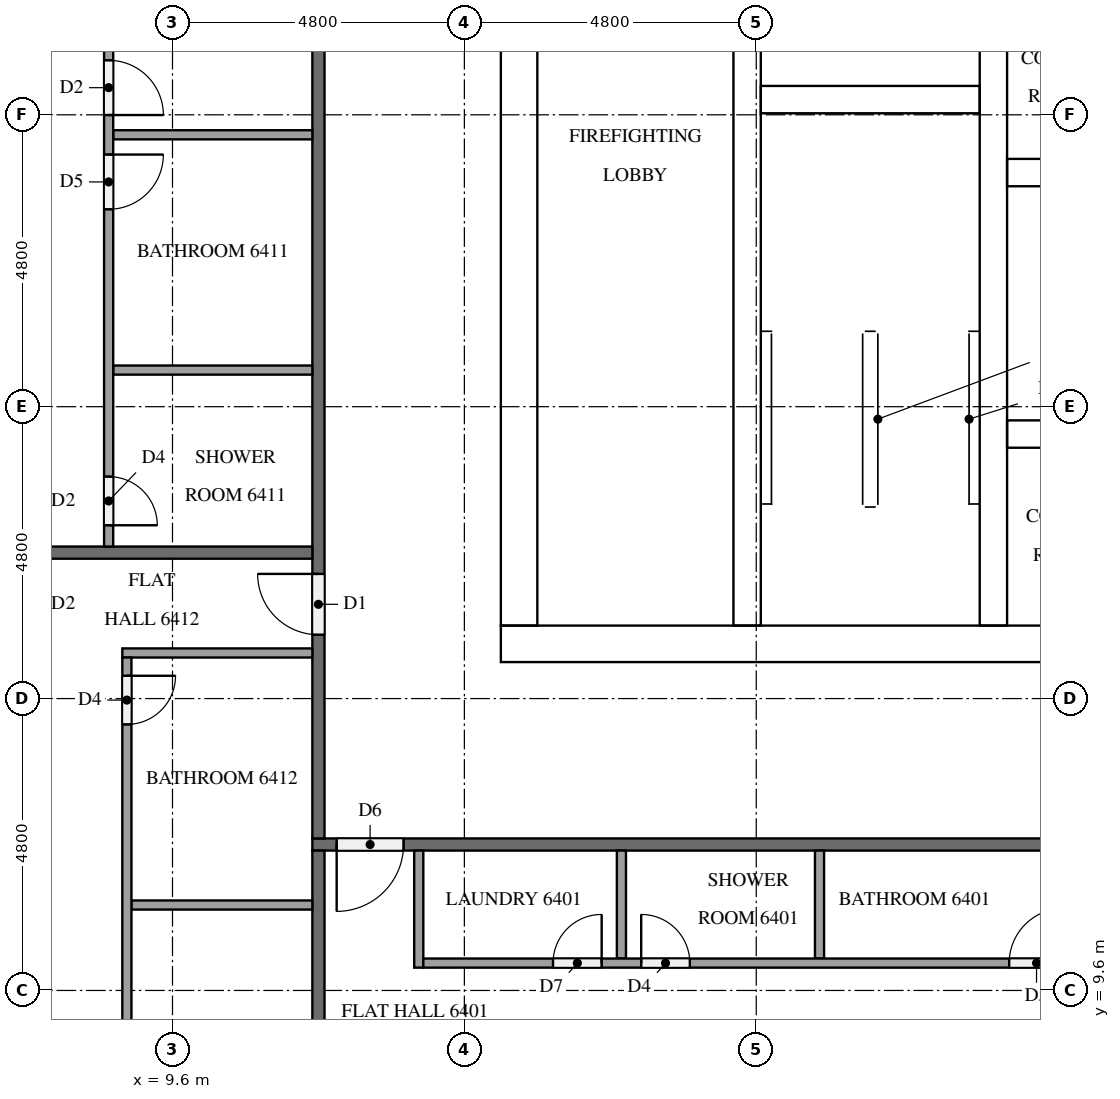
"""IFC4 building model, lengths in metres.
Left out: names, types, materials, properties, quantities, classifications, styles, units other than length and angle.
Written with IfcOpenShell. Run it as: python <this file> out.ifc"""

import sys

from ifc_helpers import new_model, si_unit, direction, frame, frame_2d, origin, place, context, subcontext, project, spatial, rectangle, extrude, element, fill, save


model = new_model("IFC4")
c1 = context("Model", 3, precision=1e-05, world=origin(), true_north=direction((0.0, 1.0)))
c2 = subcontext(c1, "Body", "Model", "MODEL_VIEW")
j1 = project(units=[si_unit("LENGTHUNIT", "METRE"), si_unit("PLANEANGLEUNIT", "RADIAN")], contexts=[c1])
p1 = place(None, origin())
s1 = spatial("IfcSite", under=j1, at=p1, CompositionType="ELEMENT")
p2 = place(p1, origin())
s2 = spatial("IfcBuilding", under=s1, at=p2, CompositionType="ELEMENT")
p3 = place(p2, frame((0.0, 0.0, 245.7)))
s3 = spatial("IfcBuildingStorey", under=s2, at=p3, CompositionType="ELEMENT", Elevation=245.7)
p4 = place(p3, frame((15.0, 15.3, 0.0), z_axis=(0.0, 0.0, 1.0), x_axis=(1.0, 0.0, 0.0)))
e1 = element("IfcWall", 1, at=p4, inside=s3, PredefinedType="SHEAR", context=c2, shape_type="SweptSolid", body=[
    extrude(rectangle(XDim=32.4, YDim=0.6, at=frame_2d((16.2, 0.0))), origin(), (0.0, 0.0, 1.0), 3.2),
])
p5 = place(p4, frame((15.3, 0.0, 0.0)))
e2 = element("IfcOpeningElement", 2, at=p5, cuts=e1, PredefinedType="OPENING", context=c2, shape_type="SweptSolid", body=[
    extrude(rectangle(XDim=1.8, YDim=2.1, at=frame_2d((0.9, 1.05))), frame((0.0, 0.31, 0.0), z_axis=(0.0, -1.0, 0.0), x_axis=(1.0, 0.0, 0.0)), (0.0, 0.0, 1.0), 0.62),
])
p6 = place(p3, frame((15.3, 15.6, 0.0), z_axis=(0.0, 0.0, 1.0), x_axis=(0.0, 1.0, 0.0)))
e3 = element("IfcWall", 3, at=p6, inside=s3, PredefinedType="SHEAR", context=c2, shape_type="SweptSolid", body=[
    extrude(rectangle(XDim=21.6, YDim=0.6, at=frame_2d((10.8, 0.0))), origin(), (0.0, 0.0, 1.0), 3.2),
])
p7 = place(p6, frame((5.16, 0.0, 0.0)))
e4 = element("IfcOpeningElement", 4, at=p7, cuts=e3, PredefinedType="OPENING", context=c2, shape_type="SweptSolid", body=[
    extrude(rectangle(XDim=1.2, YDim=2.1, at=frame_2d((0.6, 1.05))), frame((0.0, 0.31, 0.0), z_axis=(0.0, -1.0, 0.0), x_axis=(1.0, 0.0, 0.0)), (0.0, 0.0, 1.0), 0.62),
])
p8 = place(p3, frame((19.05, 15.6, 0.0), z_axis=(0.0, 0.0, 1.0), x_axis=(0.0, 1.0, 0.0)))
e5 = element("IfcWall", 5, at=p8, inside=s3, PredefinedType="SHEAR", context=c2, shape_type="SweptSolid", body=[
    extrude(rectangle(XDim=15.425, YDim=0.45, at=frame_2d((7.712, 0.0))), origin(), (0.0, 0.0, 1.0), 3.2),
])
p9 = place(p8, frame((9.85, 0.0, 0.0)))
e6 = element("IfcOpeningElement", 6, at=p9, cuts=e5, PredefinedType="OPENING", context=c2, shape_type="SweptSolid", body=[
    extrude(rectangle(XDim=1.1, YDim=2.1, at=frame_2d((0.55, 1.05))), frame((0.0, 0.235, 0.0), z_axis=(0.0, -1.0, 0.0), x_axis=(1.0, 0.0, 0.0)), (0.0, 0.0, 1.0), 0.47),
])
p10 = place(p8, frame((13.35, 0.0, 0.0)))
e7 = element("IfcOpeningElement", 7, at=p10, cuts=e5, PredefinedType="OPENING", context=c2, shape_type="SweptSolid", body=[
    extrude(rectangle(XDim=1.1, YDim=2.1, at=frame_2d((0.55, 1.05))), frame((0.0, 0.235, 0.0), z_axis=(0.0, -1.0, 0.0), x_axis=(1.0, 0.0, 0.0)), (0.0, 0.0, 1.0), 0.47),
])
p11 = place(p8, frame((0.6, 0.0, 0.0)))
e8 = element("IfcOpeningElement", 8, at=p11, cuts=e5, PredefinedType="OPENING", context=c2, shape_type="SweptSolid", body=[
    extrude(rectangle(XDim=1.2, YDim=2.1, at=frame_2d((0.6, 1.05))), frame((0.0, 0.235, 0.0), z_axis=(0.0, -1.0, 0.0), x_axis=(1.0, 0.0, 0.0)), (0.0, 0.0, 1.0), 0.47),
])
p12 = place(p3, frame((23.1, 15.6, 0.0), z_axis=(0.0, 0.0, 1.0), x_axis=(0.0, 1.0, 0.0)))
e9 = element("IfcWall", 9, at=p12, inside=s3, PredefinedType="SHEAR", context=c2, shape_type="SweptSolid", body=[
    extrude(rectangle(XDim=21.6, YDim=0.45, at=frame_2d((10.8, 0.0))), origin(), (0.0, 0.0, 1.0), 3.2),
])
p13 = place(p3, frame((19.275, 24.25, 0.0), z_axis=(0.0, 0.0, 1.0), x_axis=(1.0, 0.0, 0.0)))
e10 = element("IfcWall", 10, at=p13, inside=s3, PredefinedType="SHEAR", context=c2, shape_type="SweptSolid", body=[
    extrude(rectangle(XDim=3.6, YDim=0.45, at=frame_2d((1.8, 0.0))), origin(), (0.0, 0.0, 1.0), 3.2),
])
p14 = place(p3, frame((23.325, 18.75, 0.0), z_axis=(0.0, 0.0, 1.0), x_axis=(1.0, 0.0, 0.0)))
e11 = element("IfcWall", 11, at=p14, inside=s3, PredefinedType="SHEAR", context=c2, shape_type="SweptSolid", body=[
    extrude(rectangle(XDim=5.6, YDim=0.45, at=frame_2d((2.8, 0.0))), origin(), (0.0, 0.0, 1.0), 3.2),
])
p15 = place(p14, frame((0.403, 0.0, 0.0)))
e12 = element("IfcOpeningElement", 12, at=p15, cuts=e11, PredefinedType="OPENING", context=c2, shape_type="SweptSolid", body=[
    extrude(rectangle(XDim=1.0, YDim=2.1, at=frame_2d((0.5, 1.05))), frame((0.0, 0.235, 0.0), z_axis=(0.0, -1.0, 0.0), x_axis=(1.0, 0.0, 0.0)), (0.0, 0.0, 1.0), 0.47),
])
p16 = place(p14, frame((3.078, 0.0, 0.0)))
e13 = element("IfcOpeningElement", 13, at=p16, cuts=e11, PredefinedType="OPENING", context=c2, shape_type="SweptSolid", body=[
    extrude(rectangle(XDim=1.0, YDim=2.1, at=frame_2d((0.5, 1.05))), frame((0.0, 0.235, 0.0), z_axis=(0.0, -1.0, 0.0), x_axis=(1.0, 0.0, 0.0)), (0.0, 0.0, 1.0), 0.47),
])
p17 = place(p3, frame((23.325, 23.05, 0.0), z_axis=(0.0, 0.0, 1.0), x_axis=(1.0, 0.0, 0.0)))
e14 = element("IfcWall", 14, at=p17, inside=s3, PredefinedType="SHEAR", context=c2, shape_type="SweptSolid", body=[
    extrude(rectangle(XDim=15.75, YDim=0.45, at=frame_2d((7.875, 0.0))), origin(), (0.0, 0.0, 1.0), 3.2),
])
p18 = place(p17, frame((0.32, 0.0, 0.0)))
e15 = element("IfcOpeningElement", 15, at=p18, cuts=e14, PredefinedType="OPENING", context=c2, shape_type="SweptSolid", body=[
    extrude(rectangle(XDim=1.0, YDim=2.1, at=frame_2d((0.5, 1.05))), frame((0.0, 0.235, 0.0), z_axis=(0.0, -1.0, 0.0), x_axis=(1.0, 0.0, 0.0)), (0.0, 0.0, 1.0), 0.47),
])
p19 = place(p17, frame((2.978, 0.0, 0.0)))
e16 = element("IfcOpeningElement", 16, at=p19, cuts=e14, PredefinedType="OPENING", context=c2, shape_type="SweptSolid", body=[
    extrude(rectangle(XDim=1.0, YDim=2.1, at=frame_2d((0.5, 1.05))), frame((0.0, 0.235, 0.0), z_axis=(0.0, -1.0, 0.0), x_axis=(1.0, 0.0, 0.0)), (0.0, 0.0, 1.0), 0.47),
])
p20 = place(p17, frame((10.953, 0.0, 0.0)))
e17 = element("IfcOpeningElement", 17, at=p20, cuts=e14, PredefinedType="OPENING", context=c2, shape_type="SweptSolid", body=[
    extrude(rectangle(XDim=1.0, YDim=2.1, at=frame_2d((0.5, 1.05))), frame((0.0, 0.235, 0.0), z_axis=(0.0, -1.0, 0.0), x_axis=(1.0, 0.0, 0.0)), (0.0, 0.0, 1.0), 0.47),
])
p21 = place(p17, frame((13.612, 0.0, 0.0)))
e18 = element("IfcOpeningElement", 18, at=p21, cuts=e14, PredefinedType="OPENING", context=c2, shape_type="SweptSolid", body=[
    extrude(rectangle(XDim=1.0, YDim=2.1, at=frame_2d((0.5, 1.05))), frame((0.0, 0.235, 0.0), z_axis=(0.0, -1.0, 0.0), x_axis=(1.0, 0.0, 0.0)), (0.0, 0.0, 1.0), 0.47),
])
p22 = place(p3, frame((50.5, 12.0, 0.0), z_axis=(0.0, 0.0, 1.0), x_axis=(-1.0, 0.0, 0.0)))
e19 = element("IfcWall", 19, at=p22, inside=s3, PredefinedType="PARTITIONING", context=c2, shape_type="SweptSolid", body=[
    extrude(rectangle(XDim=38.6, YDim=0.2, at=frame_2d((19.3, 0.0))), origin(), (0.0, 0.0, 1.0), 3.2),
])
p23 = place(p22, frame((37.1, 0.0, 0.0)))
e20 = element("IfcOpeningElement", 20, at=p23, cuts=e19, PredefinedType="OPENING", context=c2, shape_type="SweptSolid", body=[
    extrude(rectangle(XDim=1.1, YDim=2.1, at=frame_2d((0.55, 1.05))), frame((0.0, 0.11, 0.0), z_axis=(0.0, -1.0, 0.0), x_axis=(1.0, 0.0, 0.0)), (0.0, 0.0, 1.0), 0.22),
])
p24 = place(p22, frame((17.95, 0.0, 0.0)))
e21 = element("IfcOpeningElement", 21, at=p24, cuts=e19, PredefinedType="OPENING", context=c2, shape_type="SweptSolid", body=[
    extrude(rectangle(XDim=1.0, YDim=2.1, at=frame_2d((0.5, 1.05))), frame((0.0, 0.11, 0.0), z_axis=(0.0, -1.0, 0.0), x_axis=(1.0, 0.0, 0.0)), (0.0, 0.0, 1.0), 0.22),
])
p25 = place(p22, frame((8.35, 0.0, 0.0)))
e22 = element("IfcOpeningElement", 22, at=p25, cuts=e19, PredefinedType="OPENING", context=c2, shape_type="SweptSolid", body=[
    extrude(rectangle(XDim=1.0, YDim=2.1, at=frame_2d((0.5, 1.05))), frame((0.0, 0.11, 0.0), z_axis=(0.0, -1.0, 0.0), x_axis=(1.0, 0.0, 0.0)), (0.0, 0.0, 1.0), 0.22),
])
p26 = place(p3, frame((12.0, 12.1, 0.0), z_axis=(0.0, 0.0, 1.0), x_axis=(0.0, 1.0, 0.0)))
e23 = element("IfcWall", 23, at=p26, inside=s3, PredefinedType="PARTITIONING", context=c2, shape_type="SweptSolid", body=[
    extrude(rectangle(XDim=28.6, YDim=0.2, at=frame_2d((14.3, 0.0))), origin(), (0.0, 0.0, 1.0), 3.2),
])
p27 = place(p26, frame((27.35, 0.0, 0.0)))
e24 = element("IfcOpeningElement", 24, at=p27, cuts=e23, PredefinedType="OPENING", context=c2, shape_type="SweptSolid", body=[
    extrude(rectangle(XDim=1.0, YDim=2.1, at=frame_2d((0.5, 1.05))), frame((0.0, 0.11, 0.0), z_axis=(0.0, -1.0, 0.0), x_axis=(1.0, 0.0, 0.0)), (0.0, 0.0, 1.0), 0.22),
])
p28 = place(p26, frame((17.75, 0.0, 0.0)))
e25 = element("IfcOpeningElement", 25, at=p28, cuts=e23, PredefinedType="OPENING", context=c2, shape_type="SweptSolid", body=[
    extrude(rectangle(XDim=1.0, YDim=2.1, at=frame_2d((0.5, 1.05))), frame((0.0, 0.11, 0.0), z_axis=(0.0, -1.0, 0.0), x_axis=(1.0, 0.0, 0.0)), (0.0, 0.0, 1.0), 0.22),
])
p29 = place(p26, frame((3.35, 0.0, 0.0)))
e26 = element("IfcOpeningElement", 26, at=p29, cuts=e23, PredefinedType="OPENING", context=c2, shape_type="SweptSolid", body=[
    extrude(rectangle(XDim=1.0, YDim=2.1, at=frame_2d((0.5, 1.05))), frame((0.0, 0.11, 0.0), z_axis=(0.0, -1.0, 0.0), x_axis=(1.0, 0.0, 0.0)), (0.0, 0.0, 1.0), 0.22),
])
p30 = place(p3, frame((12.0, 4.9, 0.0), z_axis=(0.0, 0.0, 1.0), x_axis=(0.0, 1.0, 0.0)))
e27 = element("IfcWall", 27, at=p30, inside=s3, PredefinedType="PARTITIONING", context=c2, shape_type="SweptSolid", body=[
    extrude(rectangle(XDim=7.0, YDim=0.2, at=frame_2d((3.5, 0.0))), origin(), (0.0, 0.0, 1.0), 3.2),
])
p31 = place(p3, frame((0.1, 16.8, 0.0), z_axis=(0.0, 0.0, 1.0), x_axis=(1.0, 0.0, 0.0)))
e28 = element("IfcWall", 28, at=p31, inside=s3, PredefinedType="PARTITIONING", context=c2, shape_type="SweptSolid", body=[
    extrude(rectangle(XDim=11.8, YDim=0.2, at=frame_2d((5.9, 0.0))), origin(), (0.0, 0.0, 1.0), 3.2),
])
for number, where, z_axis, x_axis in (
    (29, (16.983, 11.9, 0.0), (0.0, 0.0, 1.0), (0.0, -1.0, 0.0)),
    (30, (20.24, 11.9, 0.0), (0.0, 0.0, 1.0), (0.0, -1.0, 0.0)),
):
    element("IfcWall", number, at=place(p3, frame(where, z_axis=z_axis, x_axis=x_axis)), inside=s3, PredefinedType="PARTITIONING", context=c2, shape_type="SweptSolid", body=[
        extrude(rectangle(XDim=1.775, YDim=0.15, at=frame_2d((0.887, 0.0))), origin(), (0.0, 0.0, 1.0), 3.2),
    ])
p32 = place(p3, frame((13.65, 11.9, 0.0), z_axis=(0.0, 0.0, 1.0), x_axis=(0.0, -1.0, 0.0)))
e31 = element("IfcWall", 31, at=p32, inside=s3, PredefinedType="PARTITIONING", context=c2, shape_type="SweptSolid", body=[
    extrude(rectangle(XDim=1.925, YDim=0.15, at=frame_2d((0.962, 0.0))), origin(), (0.0, 0.0, 1.0), 3.2),
])
p33 = place(p3, frame((13.725, 10.05, 0.0), z_axis=(0.0, 0.0, 1.0), x_axis=(1.0, 0.0, 0.0)))
e32 = element("IfcWall", 32, at=p33, inside=s3, PredefinedType="PARTITIONING", context=c2, shape_type="SweptSolid", body=[
    extrude(rectangle(XDim=17.375, YDim=0.15, at=frame_2d((8.688, 0.0))), origin(), (0.0, 0.0, 1.0), 3.2),
])
p34 = place(p33, frame((2.133, 0.0, 0.0)))
e33 = element("IfcOpeningElement", 33, at=p34, cuts=e32, PredefinedType="OPENING", context=c2, shape_type="SweptSolid", body=[
    extrude(rectangle(XDim=0.8, YDim=2.1, at=frame_2d((0.4, 1.05))), frame((0.0, 0.085, 0.0), z_axis=(0.0, -1.0, 0.0), x_axis=(1.0, 0.0, 0.0)), (0.0, 0.0, 1.0), 0.17),
])
p35 = place(p33, frame((3.583, 0.0, 0.0)))
e34 = element("IfcOpeningElement", 34, at=p35, cuts=e32, PredefinedType="OPENING", context=c2, shape_type="SweptSolid", body=[
    extrude(rectangle(XDim=0.8, YDim=2.1, at=frame_2d((0.4, 1.05))), frame((0.0, 0.085, 0.0), z_axis=(0.0, -1.0, 0.0), x_axis=(1.0, 0.0, 0.0)), (0.0, 0.0, 1.0), 0.17),
])
p36 = place(p33, frame((9.635, 0.0, 0.0)))
e35 = element("IfcOpeningElement", 35, at=p36, cuts=e32, PredefinedType="OPENING", context=c2, shape_type="SweptSolid", body=[
    extrude(rectangle(XDim=0.9, YDim=2.1, at=frame_2d((0.45, 1.05))), frame((0.0, 0.085, 0.0), z_axis=(0.0, -1.0, 0.0), x_axis=(1.0, 0.0, 0.0)), (0.0, 0.0, 1.0), 0.17),
])
p37 = place(p33, frame((11.184, 0.0, 0.0)))
e36 = element("IfcOpeningElement", 36, at=p37, cuts=e32, PredefinedType="OPENING", context=c2, shape_type="SweptSolid", body=[
    extrude(rectangle(XDim=0.9, YDim=2.1, at=frame_2d((0.45, 1.05))), frame((0.0, 0.085, 0.0), z_axis=(0.0, -1.0, 0.0), x_axis=(1.0, 0.0, 0.0)), (0.0, 0.0, 1.0), 0.17),
])
for number, where, z_axis, x_axis in (
    (37, (11.9, 23.671, 0.0), (0.0, 0.0, 1.0), (-1.0, 0.0, 0.0)),
    (38, (11.9, 19.802, 0.0), (0.0, 0.0, 1.0), (-1.0, 0.0, 0.0)),
):
    element("IfcWall", number, at=place(p3, frame(where, z_axis=z_axis, x_axis=x_axis)), inside=s3, PredefinedType="PARTITIONING", context=c2, shape_type="SweptSolid", body=[
        extrude(rectangle(XDim=3.275, YDim=0.15, at=frame_2d((1.637, 0.0))), origin(), (0.0, 0.0, 1.0), 3.2),
    ])
p38 = place(p3, frame((8.55, 29.475, 0.0), z_axis=(0.0, 0.0, 1.0), x_axis=(0.0, -1.0, 0.0)))
e39 = element("IfcWall", 39, at=p38, inside=s3, PredefinedType="PARTITIONING", context=c2, shape_type="SweptSolid", body=[
    extrude(rectangle(XDim=12.575, YDim=0.15, at=frame_2d((6.288, 0.0))), origin(), (0.0, 0.0, 1.0), 3.2),
])
p39 = place(p38, frame((4.579, 0.0, 0.0)))
e40 = element("IfcOpeningElement", 40, at=p39, cuts=e39, PredefinedType="OPENING", context=c2, shape_type="SweptSolid", body=[
    extrude(rectangle(XDim=0.9, YDim=2.1, at=frame_2d((0.45, 1.05))), frame((0.0, 0.085, 0.0), z_axis=(0.0, -1.0, 0.0), x_axis=(1.0, 0.0, 0.0)), (0.0, 0.0, 1.0), 0.17),
])
p40 = place(p38, frame((6.129, 0.0, 0.0)))
e41 = element("IfcOpeningElement", 41, at=p40, cuts=e39, PredefinedType="OPENING", context=c2, shape_type="SweptSolid", body=[
    extrude(rectangle(XDim=0.9, YDim=2.1, at=frame_2d((0.45, 1.05))), frame((0.0, 0.085, 0.0), z_axis=(0.0, -1.0, 0.0), x_axis=(1.0, 0.0, 0.0)), (0.0, 0.0, 1.0), 0.17),
])
p41 = place(p38, frame((11.425, 0.0, 0.0)))
e42 = element("IfcOpeningElement", 42, at=p41, cuts=e39, PredefinedType="OPENING", context=c2, shape_type="SweptSolid", body=[
    extrude(rectangle(XDim=0.8, YDim=2.1, at=frame_2d((0.4, 1.05))), frame((0.0, 0.085, 0.0), z_axis=(0.0, -1.0, 0.0), x_axis=(1.0, 0.0, 0.0)), (0.0, 0.0, 1.0), 0.17),
])
p42 = place(p3, frame((11.9, 11.005, 0.0), z_axis=(0.0, 0.0, 1.0), x_axis=(-1.0, 0.0, 0.0)))
e43 = element("IfcWall", 43, at=p42, inside=s3, PredefinedType="PARTITIONING", context=c2, shape_type="SweptSolid", body=[
    extrude(rectangle(XDim=2.975, YDim=0.15, at=frame_2d((1.487, 0.0))), origin(), (0.0, 0.0, 1.0), 3.2),
])
p43 = place(p3, frame((11.9, 15.15, 0.0), z_axis=(0.0, 0.0, 1.0), x_axis=(-1.0, 0.0, 0.0)))
e44 = element("IfcWall", 44, at=p43, inside=s3, PredefinedType="PARTITIONING", context=c2, shape_type="SweptSolid", body=[
    extrude(rectangle(XDim=3.125, YDim=0.15, at=frame_2d((1.562, 0.0))), origin(), (0.0, 0.0, 1.0), 3.2),
])
p44 = place(p3, frame((8.85, 15.075, 0.0), z_axis=(0.0, 0.0, 1.0), x_axis=(0.0, -1.0, 0.0)))
e45 = element("IfcWall", 45, at=p44, inside=s3, PredefinedType="PARTITIONING", context=c2, shape_type="SweptSolid", body=[
    extrude(rectangle(XDim=10.175, YDim=0.15, at=frame_2d((5.087, 0.0))), origin(), (0.0, 0.0, 1.0), 3.2),
])
p45 = place(p44, frame((0.3, 0.0, 0.0)))
e46 = element("IfcOpeningElement", 46, at=p45, cuts=e45, PredefinedType="OPENING", context=c2, shape_type="SweptSolid", body=[
    extrude(rectangle(XDim=0.8, YDim=2.1, at=frame_2d((0.4, 1.05))), frame((0.0, 0.085, 0.0), z_axis=(0.0, -1.0, 0.0), x_axis=(1.0, 0.0, 0.0)), (0.0, 0.0, 1.0), 0.17),
])
p46 = place(p44, frame((8.925, 0.0, 0.0)))
e47 = element("IfcOpeningElement", 47, at=p46, cuts=e45, PredefinedType="OPENING", context=c2, shape_type="SweptSolid", body=[
    extrude(rectangle(XDim=0.9, YDim=2.1, at=frame_2d((0.45, 1.05))), frame((0.0, 0.085, 0.0), z_axis=(0.0, -1.0, 0.0), x_axis=(1.0, 0.0, 0.0)), (0.0, 0.0, 1.0), 0.17),
])
p47 = place(p11, frame((1.2, 0.0, 0.0), z_axis=(0.0, 0.0, 1.0), x_axis=(-1.0, 0.0, 0.0)))
e48 = element("IfcDoor", 48, at=p47, inside=s3, OperationType="SINGLE_SWING_RIGHT", PredefinedType="DOOR", context=c2, shape_type="SweptSolid", body=[
    extrude(rectangle(XDim=1.2, YDim=2.1, at=frame_2d((0.6, 1.05))), frame((0.0, 0.025, 0.0), z_axis=(0.0, -1.0, 0.0), x_axis=(1.0, 0.0, 0.0)), (0.0, 0.0, 1.0), 0.05),
])
fill(e8, e48)
p48 = place(p7, frame((1.2, 0.0, 0.0), z_axis=(0.0, 0.0, 1.0), x_axis=(-1.0, 0.0, 0.0)))
e49 = element("IfcDoor", 49, at=p48, inside=s3, OperationType="SINGLE_SWING_LEFT", PredefinedType="DOOR", context=c2, shape_type="SweptSolid", body=[
    extrude(rectangle(XDim=1.2, YDim=2.1, at=frame_2d((0.6, 1.05))), frame((0.0, 0.025, 0.0), z_axis=(0.0, -1.0, 0.0), x_axis=(1.0, 0.0, 0.0)), (0.0, 0.0, 1.0), 0.05),
])
fill(e4, e49)
p49 = place(p18, frame((1.0, 0.0, 0.0), z_axis=(0.0, 0.0, 1.0), x_axis=(-1.0, 0.0, 0.0)))
e50 = element("IfcDoor", 50, at=p49, inside=s3, OperationType="SINGLE_SWING_LEFT", PredefinedType="DOOR", context=c2, shape_type="SweptSolid", body=[
    extrude(rectangle(XDim=1.0, YDim=2.1, at=frame_2d((0.5, 1.05))), frame((0.0, 0.025, 0.0), z_axis=(0.0, -1.0, 0.0), x_axis=(1.0, 0.0, 0.0)), (0.0, 0.0, 1.0), 0.05),
])
fill(e15, e50)
p50 = place(p15, origin())
e51 = element("IfcDoor", 51, at=p50, inside=s3, OperationType="SINGLE_SWING_LEFT", PredefinedType="DOOR", context=c2, shape_type="SweptSolid", body=[
    extrude(rectangle(XDim=1.0, YDim=2.1, at=frame_2d((0.5, 1.05))), frame((0.0, 0.025, 0.0), z_axis=(0.0, -1.0, 0.0), x_axis=(1.0, 0.0, 0.0)), (0.0, 0.0, 1.0), 0.05),
])
fill(e12, e51)
p51 = place(p23, origin())
e52 = element("IfcDoor", 52, at=p51, inside=s3, OperationType="SINGLE_SWING_RIGHT", PredefinedType="DOOR", context=c2, shape_type="SweptSolid", body=[
    extrude(rectangle(XDim=1.1, YDim=2.1, at=frame_2d((0.55, 1.05))), frame((0.0, 0.025, 0.0), z_axis=(0.0, -1.0, 0.0), x_axis=(1.0, 0.0, 0.0)), (0.0, 0.0, 1.0), 0.05),
])
fill(e20, e52)
p52 = place(p29, origin())
e53 = element("IfcDoor", 53, at=p52, inside=s3, OperationType="SINGLE_SWING_RIGHT", PredefinedType="DOOR", context=c2, shape_type="SweptSolid", body=[
    extrude(rectangle(XDim=1.0, YDim=2.1, at=frame_2d((0.5, 1.05))), frame((0.0, 0.025, 0.0), z_axis=(0.0, -1.0, 0.0), x_axis=(1.0, 0.0, 0.0)), (0.0, 0.0, 1.0), 0.05),
])
fill(e26, e53)
p53 = place(p34, origin())
e54 = element("IfcDoor", 54, at=p53, inside=s3, OperationType="SINGLE_SWING_RIGHT", PredefinedType="DOOR", context=c2, shape_type="SweptSolid", body=[
    extrude(rectangle(XDim=0.8, YDim=2.1, at=frame_2d((0.4, 1.05))), frame((0.0, 0.025, 0.0), z_axis=(0.0, -1.0, 0.0), x_axis=(1.0, 0.0, 0.0)), (0.0, 0.0, 1.0), 0.05),
])
fill(e33, e54)
p54 = place(p35, origin())
e55 = element("IfcDoor", 55, at=p54, inside=s3, OperationType="SINGLE_SWING_LEFT", PredefinedType="DOOR", context=c2, shape_type="SweptSolid", body=[
    extrude(rectangle(XDim=0.8, YDim=2.1, at=frame_2d((0.4, 1.05))), frame((0.0, 0.025, 0.0), z_axis=(0.0, -1.0, 0.0), x_axis=(1.0, 0.0, 0.0)), (0.0, 0.0, 1.0), 0.05),
])
fill(e34, e55)
p55 = place(p36, origin())
e56 = element("IfcDoor", 56, at=p55, inside=s3, OperationType="SINGLE_SWING_RIGHT", PredefinedType="DOOR", context=c2, shape_type="SweptSolid", body=[
    extrude(rectangle(XDim=0.9, YDim=2.1, at=frame_2d((0.45, 1.05))), frame((0.0, 0.025, 0.0), z_axis=(0.0, -1.0, 0.0), x_axis=(1.0, 0.0, 0.0)), (0.0, 0.0, 1.0), 0.05),
])
fill(e35, e56)
p56 = place(p39, origin())
e57 = element("IfcDoor", 57, at=p56, inside=s3, OperationType="SINGLE_SWING_RIGHT", PredefinedType="DOOR", context=c2, shape_type="SweptSolid", body=[
    extrude(rectangle(XDim=0.9, YDim=2.1, at=frame_2d((0.45, 1.05))), frame((0.0, 0.025, 0.0), z_axis=(0.0, -1.0, 0.0), x_axis=(1.0, 0.0, 0.0)), (0.0, 0.0, 1.0), 0.05),
])
fill(e40, e57)
p57 = place(p40, origin())
e58 = element("IfcDoor", 58, at=p57, inside=s3, OperationType="SINGLE_SWING_LEFT", PredefinedType="DOOR", context=c2, shape_type="SweptSolid", body=[
    extrude(rectangle(XDim=0.9, YDim=2.1, at=frame_2d((0.45, 1.05))), frame((0.0, 0.025, 0.0), z_axis=(0.0, -1.0, 0.0), x_axis=(1.0, 0.0, 0.0)), (0.0, 0.0, 1.0), 0.05),
])
fill(e41, e58)
p58 = place(p41, origin())
e59 = element("IfcDoor", 59, at=p58, inside=s3, OperationType="SINGLE_SWING_RIGHT", PredefinedType="DOOR", context=c2, shape_type="SweptSolid", body=[
    extrude(rectangle(XDim=0.8, YDim=2.1, at=frame_2d((0.4, 1.05))), frame((0.0, 0.025, 0.0), z_axis=(0.0, -1.0, 0.0), x_axis=(1.0, 0.0, 0.0)), (0.0, 0.0, 1.0), 0.05),
])
fill(e42, e59)
p59 = place(p45, origin())
e60 = element("IfcDoor", 60, at=p59, inside=s3, OperationType="SINGLE_SWING_LEFT", PredefinedType="DOOR", context=c2, shape_type="SweptSolid", body=[
    extrude(rectangle(XDim=0.8, YDim=2.1, at=frame_2d((0.4, 1.05))), frame((0.0, 0.025, 0.0), z_axis=(0.0, -1.0, 0.0), x_axis=(1.0, 0.0, 0.0)), (0.0, 0.0, 1.0), 0.05),
])
fill(e46, e60)
save(model, sys.argv[1])
